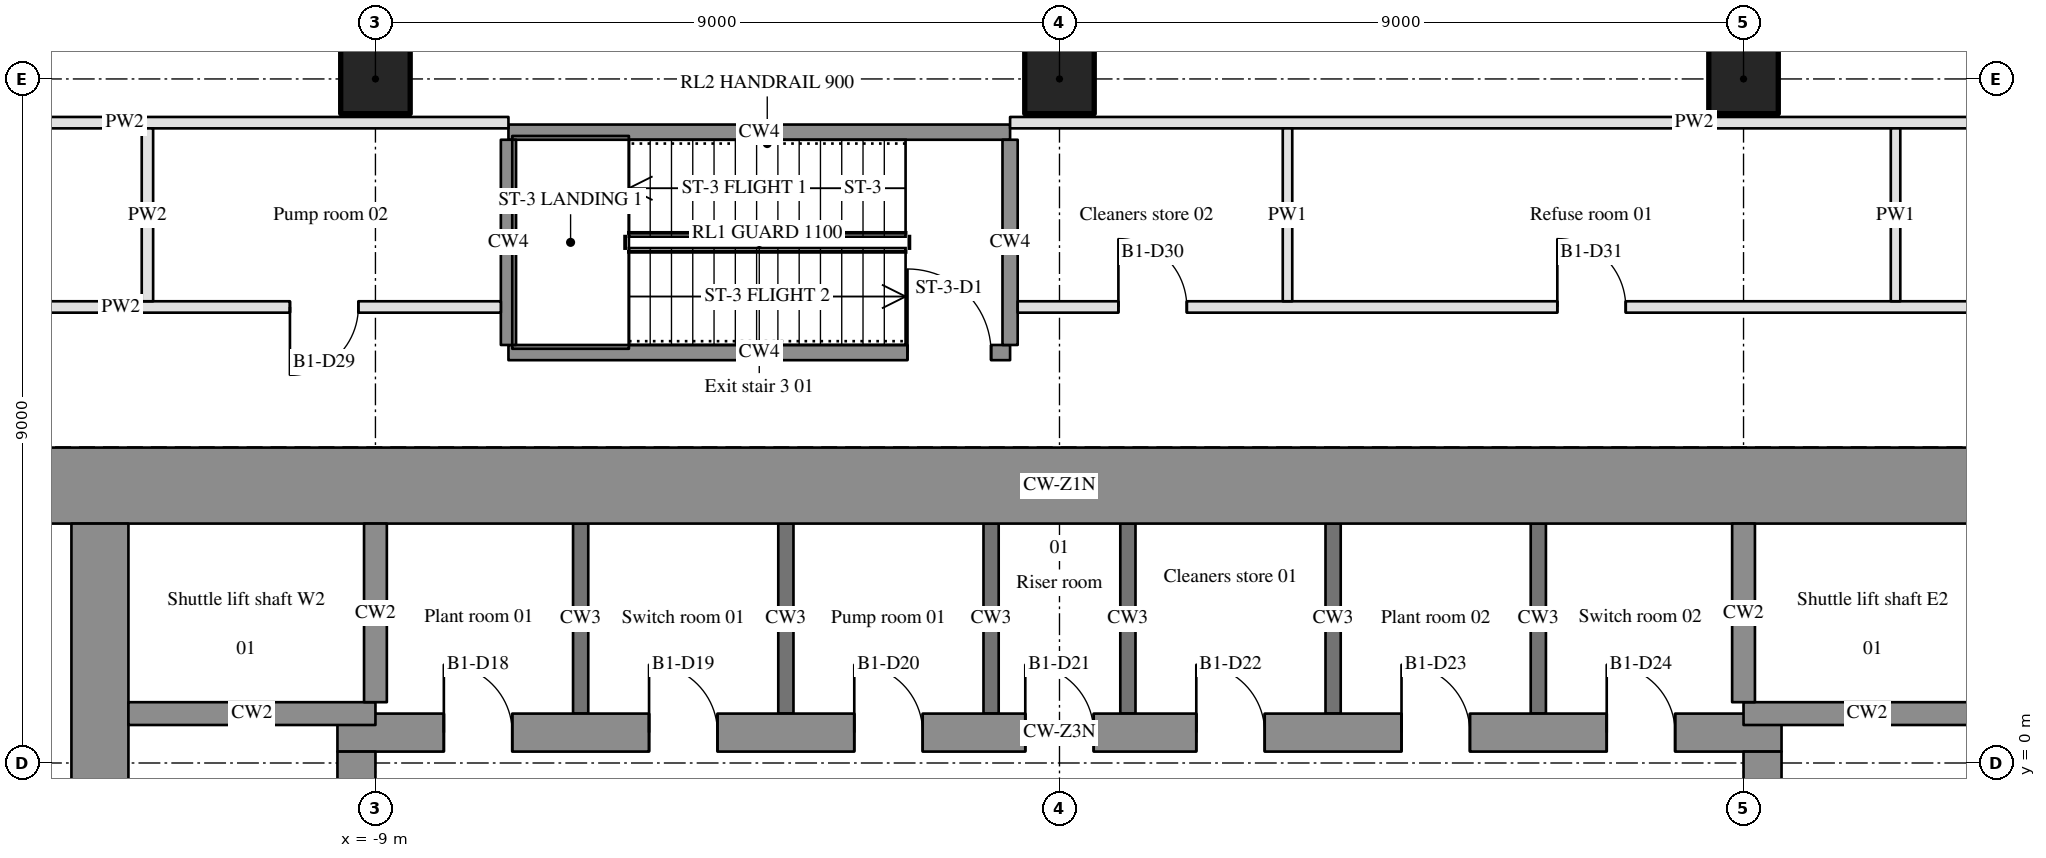
"""IFC4 building model, lengths in metres.
Left out: names, types, materials, properties, quantities, classifications, styles, units other than length and angle.
Written with IfcOpenShell. Run it as: python <this file> out.ifc"""

import sys

from ifc_helpers import new_model, si_unit, direction, frame, frame_2d, origin, origin_2d, place, context, subcontext, project, spatial, rectangle, hollow_circle, extrude, element, fill, save


model = new_model("IFC4")
c1 = context("Model", 3, precision=1e-05, world=origin(), true_north=direction((0.0, 1.0)))
c2 = subcontext(c1, "Body", "Model", "MODEL_VIEW")
j1 = project(units=[si_unit("LENGTHUNIT", "METRE"), si_unit("PLANEANGLEUNIT", "RADIAN")], contexts=[c1])
p1 = place(None, origin())
s1 = spatial("IfcSite", under=j1, at=p1, CompositionType="ELEMENT")
p2 = place(p1, origin())
s2 = spatial("IfcBuilding", under=s1, at=p2, CompositionType="ELEMENT")
p3 = place(p2, frame((0.0, 0.0, -5.0)))
s3 = spatial("IfcBuildingStorey", under=s2, at=p3, CompositionType="ELEMENT", Elevation=-5.0)
for number, where, z_axis, x_axis in (
    (1, (-9.0, 9.0, -0.25), (0.0, 0.0, 1.0), (1.0, 0.0, 0.0)),
    (2, (0.0, 9.0, -0.25), (0.0, 0.0, 1.0), (1.0, 0.0, 0.0)),
    (3, (9.0, 9.0, -0.25), (0.0, 0.0, 1.0), (1.0, 0.0, 0.0)),
):
    element("IfcColumn", number, at=place(p3, frame(where, z_axis=z_axis, x_axis=x_axis)), inside=s3, PredefinedType="COLUMN", context=c2, shape_type="SweptSolid", body=[
        extrude(hollow_circle(Radius=0.457, WallThickness=0.05, at=origin_2d()), origin(), (0.0, 0.0, 1.0), 5.25),
    ])
p4 = place(p3, frame((-15.0, 3.65, -0.25), z_axis=(0.0, 0.0, 1.0), x_axis=(1.0, 0.0, 0.0)))
e4 = element("IfcWall", 4, at=p4, inside=s3, PredefinedType="SHEAR", context=c2, shape_type="SweptSolid", body=[
    extrude(rectangle(XDim=30.0, YDim=1.0, at=frame_2d((15.0, 0.0))), origin(), (0.0, 0.0, 1.0), 5.25),
])
p5 = place(p3, frame((-12.625, -11.5, -0.25), z_axis=(0.0, 0.0, 1.0), x_axis=(0.0, 1.0, 0.0)))
e5 = element("IfcWall", 5, at=p5, inside=s3, PredefinedType="SHEAR", context=c2, shape_type="SweptSolid", body=[
    extrude(rectangle(XDim=14.65, YDim=0.75, at=frame_2d((7.325, 0.0))), origin(), (0.0, 0.0, 1.0), 5.25),
])
p6 = place(p5, frame((10.05, 0.0, 0.0)))
e6 = element("IfcOpeningElement", 6, at=p6, cuts=e5, PredefinedType="OPENING", context=c2, shape_type="SweptSolid", body=[
    extrude(rectangle(XDim=0.9, YDim=2.1, at=frame_2d((0.45, 1.05))), frame((0.0, 0.385, 0.0), z_axis=(0.0, -1.0, 0.0), x_axis=(1.0, 0.0, 0.0)), (0.0, 0.0, 1.0), 0.77),
])
p7 = place(p3, frame((-9.5, 0.4, -0.25), z_axis=(0.0, 0.0, 1.0), x_axis=(1.0, 0.0, 0.0)))
e7 = element("IfcWall", 7, at=p7, inside=s3, PredefinedType="SHEAR", context=c2, shape_type="SweptSolid", body=[
    extrude(rectangle(XDim=19.0, YDim=0.5, at=frame_2d((9.5, 0.0))), origin(), (0.0, 0.0, 1.0), 5.25),
])
p8 = place(p7, frame((1.4, 0.0, 0.0)))
e8 = element("IfcOpeningElement", 8, at=p8, cuts=e7, PredefinedType="OPENING", context=c2, shape_type="SweptSolid", body=[
    extrude(rectangle(XDim=0.9, YDim=2.1, at=frame_2d((0.45, 1.05))), frame((0.0, 0.26, 0.0), z_axis=(0.0, -1.0, 0.0), x_axis=(1.0, 0.0, 0.0)), (0.0, 0.0, 1.0), 0.52),
])
p9 = place(p7, frame((4.1, 0.0, 0.0)))
e9 = element("IfcOpeningElement", 9, at=p9, cuts=e7, PredefinedType="OPENING", context=c2, shape_type="SweptSolid", body=[
    extrude(rectangle(XDim=0.9, YDim=2.1, at=frame_2d((0.45, 1.05))), frame((0.0, 0.26, 0.0), z_axis=(0.0, -1.0, 0.0), x_axis=(1.0, 0.0, 0.0)), (0.0, 0.0, 1.0), 0.52),
])
p10 = place(p7, frame((6.8, 0.0, 0.0)))
e10 = element("IfcOpeningElement", 10, at=p10, cuts=e7, PredefinedType="OPENING", context=c2, shape_type="SweptSolid", body=[
    extrude(rectangle(XDim=0.9, YDim=2.1, at=frame_2d((0.45, 1.05))), frame((0.0, 0.26, 0.0), z_axis=(0.0, -1.0, 0.0), x_axis=(1.0, 0.0, 0.0)), (0.0, 0.0, 1.0), 0.52),
])
p11 = place(p7, frame((11.3, 0.0, 0.0)))
e11 = element("IfcOpeningElement", 11, at=p11, cuts=e7, PredefinedType="OPENING", context=c2, shape_type="SweptSolid", body=[
    extrude(rectangle(XDim=0.9, YDim=2.1, at=frame_2d((0.45, 1.05))), frame((0.0, 0.26, 0.0), z_axis=(0.0, -1.0, 0.0), x_axis=(1.0, 0.0, 0.0)), (0.0, 0.0, 1.0), 0.52),
])
p12 = place(p7, frame((14.0, 0.0, 0.0)))
e12 = element("IfcOpeningElement", 12, at=p12, cuts=e7, PredefinedType="OPENING", context=c2, shape_type="SweptSolid", body=[
    extrude(rectangle(XDim=0.9, YDim=2.1, at=frame_2d((0.45, 1.05))), frame((0.0, 0.26, 0.0), z_axis=(0.0, -1.0, 0.0), x_axis=(1.0, 0.0, 0.0)), (0.0, 0.0, 1.0), 0.52),
])
p13 = place(p7, frame((16.7, 0.0, 0.0)))
e13 = element("IfcOpeningElement", 13, at=p13, cuts=e7, PredefinedType="OPENING", context=c2, shape_type="SweptSolid", body=[
    extrude(rectangle(XDim=0.9, YDim=2.1, at=frame_2d((0.45, 1.05))), frame((0.0, 0.26, 0.0), z_axis=(0.0, -1.0, 0.0), x_axis=(1.0, 0.0, 0.0)), (0.0, 0.0, 1.0), 0.52),
])
p14 = place(p7, frame((9.05, 0.0, 0.0)))
e14 = element("IfcOpeningElement", 14, at=p14, cuts=e7, PredefinedType="OPENING", context=c2, shape_type="SweptSolid", body=[
    extrude(rectangle(XDim=0.9, YDim=2.1, at=frame_2d((0.45, 1.05))), frame((0.0, 0.26, 0.0), z_axis=(0.0, -1.0, 0.0), x_axis=(1.0, 0.0, 0.0)), (0.0, 0.0, 1.0), 0.52),
])
p15 = place(p3, frame((-9.25, -11.5, -0.25), z_axis=(0.0, 0.0, 1.0), x_axis=(0.0, 1.0, 0.0)))
e15 = element("IfcWall", 15, at=p15, inside=s3, PredefinedType="SHEAR", context=c2, shape_type="SweptSolid", body=[
    extrude(rectangle(XDim=11.65, YDim=0.5, at=frame_2d((5.825, 0.0))), origin(), (0.0, 0.0, 1.0), 5.25),
])
p16 = place(p15, frame((9.4, 0.0, 0.0)))
e16 = element("IfcOpeningElement", 16, at=p16, cuts=e15, PredefinedType="OPENING", context=c2, shape_type="SweptSolid", body=[
    extrude(rectangle(XDim=1.8, YDim=2.1, at=frame_2d((0.9, 1.05))), frame((0.0, 0.26, 0.0), z_axis=(0.0, -1.0, 0.0), x_axis=(1.0, 0.0, 0.0)), (0.0, 0.0, 1.0), 0.52),
])
p17 = place(p15, frame((5.25, 0.0, 0.0)))
e17 = element("IfcOpeningElement", 17, at=p17, cuts=e15, PredefinedType="OPENING", context=c2, shape_type="SweptSolid", body=[
    extrude(rectangle(XDim=1.1, YDim=2.1, at=frame_2d((0.55, 1.05))), frame((0.0, 0.26, 0.0), z_axis=(0.0, -1.0, 0.0), x_axis=(1.0, 0.0, 0.0)), (0.0, 0.0, 1.0), 0.52),
])
p18 = place(p3, frame((9.25, -11.5, -0.25), z_axis=(0.0, 0.0, 1.0), x_axis=(0.0, 1.0, 0.0)))
e18 = element("IfcWall", 18, at=p18, inside=s3, PredefinedType="SHEAR", context=c2, shape_type="SweptSolid", body=[
    extrude(rectangle(XDim=11.65, YDim=0.5, at=frame_2d((5.825, 0.0))), origin(), (0.0, 0.0, 1.0), 5.25),
])
p19 = place(p18, frame((9.4, 0.0, 0.0)))
e19 = element("IfcOpeningElement", 19, at=p19, cuts=e18, PredefinedType="OPENING", context=c2, shape_type="SweptSolid", body=[
    extrude(rectangle(XDim=1.8, YDim=2.1, at=frame_2d((0.9, 1.05))), frame((0.0, 0.26, 0.0), z_axis=(0.0, -1.0, 0.0), x_axis=(1.0, 0.0, 0.0)), (0.0, 0.0, 1.0), 0.52),
])
p20 = place(p18, frame((5.25, 0.0, 0.0)))
e20 = element("IfcOpeningElement", 20, at=p20, cuts=e18, PredefinedType="OPENING", context=c2, shape_type="SweptSolid", body=[
    extrude(rectangle(XDim=1.1, YDim=2.1, at=frame_2d((0.55, 1.05))), frame((0.0, 0.26, 0.0), z_axis=(0.0, -1.0, 0.0), x_axis=(1.0, 0.0, 0.0)), (0.0, 0.0, 1.0), 0.52),
])
for number, where, z_axis, x_axis in (
    (21, (-9.0, 0.65, 0.0), (0.0, 0.0, 1.0), (-1.0, 0.0, 0.0)),
    (22, (12.25, 0.65, 0.0), (0.0, 0.0, 1.0), (-1.0, 0.0, 0.0)),
):
    element("IfcWall", number, at=place(p3, frame(where, z_axis=z_axis, x_axis=x_axis)), inside=s3, PredefinedType="SHEAR", context=c2, shape_type="SweptSolid", body=[
        extrude(rectangle(XDim=3.25, YDim=0.3, at=frame_2d((1.625, 0.0))), origin(), (0.0, 0.0, 1.0), 5.0),
    ])
p21 = place(p3, frame((-7.25, 5.4, 0.0), z_axis=(0.0, 0.0, 1.0), x_axis=(1.0, 0.0, 0.0)))
e23 = element("IfcWall", 23, at=p21, inside=s3, PredefinedType="SHEAR", context=c2, shape_type="SweptSolid", body=[
    extrude(rectangle(XDim=6.6, YDim=0.2, at=frame_2d((3.3, 0.0))), origin(), (0.0, 0.0, 1.0), 5.0),
])
p22 = place(p21, frame((5.25, 0.0, 0.0)))
e24 = element("IfcOpeningElement", 24, at=p22, cuts=e23, PredefinedType="OPENING", context=c2, shape_type="SweptSolid", body=[
    extrude(rectangle(XDim=1.1, YDim=2.1, at=frame_2d((0.55, 1.05))), frame((0.0, 0.11, 0.0), z_axis=(0.0, -1.0, 0.0), x_axis=(1.0, 0.0, 0.0)), (0.0, 0.0, 1.0), 0.22),
])
p23 = place(p3, frame((-7.35, 6.0, 0.0), z_axis=(0.0, 0.0, 1.0), x_axis=(-1.0, 0.0, 0.0)))
e25 = element("IfcWall", 25, at=p23, inside=s3, PredefinedType="PARTITIONING", context=c2, shape_type="SweptSolid", body=[
    extrude(rectangle(XDim=10.0, YDim=0.15, at=frame_2d((5.0, 0.0))), origin(), (0.0, 0.0, 1.0), 4.06),
])
p24 = place(p23, frame((6.825, 0.0, 0.0)))
e26 = element("IfcOpeningElement", 26, at=p24, cuts=e25, PredefinedType="OPENING", context=c2, shape_type="SweptSolid", body=[
    extrude(rectangle(XDim=1.0, YDim=2.1, at=frame_2d((0.5, 1.05))), frame((0.0, 0.085, 0.0), z_axis=(0.0, -1.0, 0.0), x_axis=(1.0, 0.0, 0.0)), (0.0, 0.0, 1.0), 0.17),
])
p25 = place(p23, frame((1.875, 0.0, 0.0)))
e27 = element("IfcOpeningElement", 27, at=p25, cuts=e25, PredefinedType="OPENING", context=c2, shape_type="SweptSolid", body=[
    extrude(rectangle(XDim=0.9, YDim=2.1, at=frame_2d((0.45, 1.05))), frame((0.0, 0.085, 0.0), z_axis=(0.0, -1.0, 0.0), x_axis=(1.0, 0.0, 0.0)), (0.0, 0.0, 1.0), 0.17),
])
p26 = place(p3, frame((-0.55, 6.0, 0.0), z_axis=(0.0, 0.0, 1.0), x_axis=(1.0, 0.0, 0.0)))
e28 = element("IfcWall", 28, at=p26, inside=s3, PredefinedType="PARTITIONING", context=c2, shape_type="SweptSolid", body=[
    extrude(rectangle(XDim=17.9, YDim=0.15, at=frame_2d((8.95, 0.0))), origin(), (0.0, 0.0, 1.0), 4.06),
])
p27 = place(p26, frame((1.325, 0.0, 0.0)))
e29 = element("IfcOpeningElement", 29, at=p27, cuts=e28, PredefinedType="OPENING", context=c2, shape_type="SweptSolid", body=[
    extrude(rectangle(XDim=0.9, YDim=2.1, at=frame_2d((0.45, 1.05))), frame((0.0, 0.085, 0.0), z_axis=(0.0, -1.0, 0.0), x_axis=(1.0, 0.0, 0.0)), (0.0, 0.0, 1.0), 0.17),
])
p28 = place(p26, frame((7.1, 0.0, 0.0)))
e30 = element("IfcOpeningElement", 30, at=p28, cuts=e28, PredefinedType="OPENING", context=c2, shape_type="SweptSolid", body=[
    extrude(rectangle(XDim=0.9, YDim=2.1, at=frame_2d((0.45, 1.05))), frame((0.0, 0.085, 0.0), z_axis=(0.0, -1.0, 0.0), x_axis=(1.0, 0.0, 0.0)), (0.0, 0.0, 1.0), 0.17),
])
p29 = place(p26, frame((14.275, 0.0, 0.0)))
e31 = element("IfcOpeningElement", 31, at=p29, cuts=e28, PredefinedType="OPENING", context=c2, shape_type="SweptSolid", body=[
    extrude(rectangle(XDim=0.9, YDim=2.1, at=frame_2d((0.45, 1.05))), frame((0.0, 0.085, 0.0), z_axis=(0.0, -1.0, 0.0), x_axis=(1.0, 0.0, 0.0)), (0.0, 0.0, 1.0), 0.17),
])
p30 = place(p3, frame((-7.25, 8.3, 0.0), z_axis=(0.0, 0.0, 1.0), x_axis=(1.0, 0.0, 0.0)))
e32 = element("IfcWall", 32, at=p30, inside=s3, PredefinedType="SHEAR", context=c2, shape_type="SweptSolid", body=[
    extrude(rectangle(XDim=6.6, YDim=0.2, at=frame_2d((3.3, 0.0))), origin(), (0.0, 0.0, 1.0), 5.0),
])
p31 = place(p3, frame((-17.35, 8.425, 0.0), z_axis=(0.0, 0.0, 1.0), x_axis=(1.0, 0.0, 0.0)))
e33 = element("IfcWall", 33, at=p31, inside=s3, PredefinedType="PARTITIONING", context=c2, shape_type="SweptSolid", body=[
    extrude(rectangle(XDim=10.1, YDim=0.15, at=frame_2d((5.05, 0.0))), origin(), (0.0, 0.0, 1.0), 4.06),
])
p32 = place(p31, frame((1.775, 0.0, 0.0)))
e34 = element("IfcOpeningElement", 34, at=p32, cuts=e33, PredefinedType="OPENING", context=c2, shape_type="SweptSolid", body=[
    extrude(rectangle(XDim=1.8, YDim=2.1, at=frame_2d((0.9, 1.05))), frame((0.0, 0.085, 0.0), z_axis=(0.0, -1.0, 0.0), x_axis=(1.0, 0.0, 0.0)), (0.0, 0.0, 1.0), 0.17),
])
p33 = place(p3, frame((-0.65, 8.425, 0.0), z_axis=(0.0, 0.0, 1.0), x_axis=(1.0, 0.0, 0.0)))
e35 = element("IfcWall", 35, at=p33, inside=s3, PredefinedType="PARTITIONING", context=c2, shape_type="SweptSolid", body=[
    extrude(rectangle(XDim=18.0, YDim=0.15, at=frame_2d((9.0, 0.0))), origin(), (0.0, 0.0, 1.0), 4.06),
])
p34 = place(p3, frame((-12.0, 6.075, 0.0), z_axis=(0.0, 0.0, 1.0), x_axis=(0.0, 1.0, 0.0)))
e36 = element("IfcWall", 36, at=p34, inside=s3, PredefinedType="PARTITIONING", context=c2, shape_type="SweptSolid", body=[
    extrude(rectangle(XDim=2.275, YDim=0.15, at=frame_2d((1.138, 0.0))), origin(), (0.0, 0.0, 1.0), 4.06),
])
p35 = place(p3, frame((-9.0, 0.8, 0.0), z_axis=(0.0, 0.0, 1.0), x_axis=(0.0, 1.0, 0.0)))
e37 = element("IfcWall", 37, at=p35, inside=s3, PredefinedType="SHEAR", context=c2, shape_type="SweptSolid", body=[
    extrude(rectangle(XDim=2.35, YDim=0.3, at=frame_2d((1.175, 0.0))), origin(), (0.0, 0.0, 1.0), 5.0),
])
p36 = place(p3, frame((-7.25, 5.5, 0.0), z_axis=(0.0, 0.0, 1.0), x_axis=(0.0, 1.0, 0.0)))
e38 = element("IfcWall", 38, at=p36, inside=s3, PredefinedType="SHEAR", context=c2, shape_type="SweptSolid", body=[
    extrude(rectangle(XDim=2.7, YDim=0.2, at=frame_2d((1.35, 0.0))), origin(), (0.0, 0.0, 1.0), 5.0),
])
for number, where, z_axis, x_axis in (
    (39, (-6.3, 0.65, 0.0), (0.0, 0.0, 1.0), (0.0, 1.0, 0.0)),
    (40, (-3.6, 0.65, 0.0), (0.0, 0.0, 1.0), (0.0, 1.0, 0.0)),
    (41, (-0.9, 0.65, 0.0), (0.0, 0.0, 1.0), (0.0, 1.0, 0.0)),
):
    element("IfcWall", number, at=place(p3, frame(where, z_axis=z_axis, x_axis=x_axis)), inside=s3, PredefinedType="SOLIDWALL", context=c2, shape_type="SweptSolid", body=[
        extrude(rectangle(XDim=2.5, YDim=0.2, at=frame_2d((1.25, 0.0))), origin(), (0.0, 0.0, 1.0), 4.7),
    ])
p37 = place(p3, frame((-0.65, 5.5, 0.0), z_axis=(0.0, 0.0, 1.0), x_axis=(0.0, 1.0, 0.0)))
e42 = element("IfcWall", 42, at=p37, inside=s3, PredefinedType="SHEAR", context=c2, shape_type="SweptSolid", body=[
    extrude(rectangle(XDim=2.7, YDim=0.2, at=frame_2d((1.35, 0.0))), origin(), (0.0, 0.0, 1.0), 5.0),
])
p38 = place(p3, frame((0.9, 0.65, 0.0), z_axis=(0.0, 0.0, 1.0), x_axis=(0.0, 1.0, 0.0)))
e43 = element("IfcWall", 43, at=p38, inside=s3, PredefinedType="SOLIDWALL", context=c2, shape_type="SweptSolid", body=[
    extrude(rectangle(XDim=2.5, YDim=0.2, at=frame_2d((1.25, 0.0))), origin(), (0.0, 0.0, 1.0), 4.7),
])
p39 = place(p3, frame((3.0, 6.075, 0.0), z_axis=(0.0, 0.0, 1.0), x_axis=(0.0, 1.0, 0.0)))
e44 = element("IfcWall", 44, at=p39, inside=s3, PredefinedType="PARTITIONING", context=c2, shape_type="SweptSolid", body=[
    extrude(rectangle(XDim=2.275, YDim=0.125, at=frame_2d((1.138, 0.0))), origin(), (0.0, 0.0, 1.0), 4.06),
])
for number, where, z_axis, x_axis in (
    (45, (3.6, 0.65, 0.0), (0.0, 0.0, 1.0), (0.0, 1.0, 0.0)),
    (46, (6.3, 0.65, 0.0), (0.0, 0.0, 1.0), (0.0, 1.0, 0.0)),
):
    element("IfcWall", number, at=place(p3, frame(where, z_axis=z_axis, x_axis=x_axis)), inside=s3, PredefinedType="SOLIDWALL", context=c2, shape_type="SweptSolid", body=[
        extrude(rectangle(XDim=2.5, YDim=0.2, at=frame_2d((1.25, 0.0))), origin(), (0.0, 0.0, 1.0), 4.7),
    ])
p40 = place(p3, frame((9.0, 0.8, 0.0), z_axis=(0.0, 0.0, 1.0), x_axis=(0.0, 1.0, 0.0)))
e47 = element("IfcWall", 47, at=p40, inside=s3, PredefinedType="SHEAR", context=c2, shape_type="SweptSolid", body=[
    extrude(rectangle(XDim=2.35, YDim=0.3, at=frame_2d((1.175, 0.0))), origin(), (0.0, 0.0, 1.0), 5.0),
])
p41 = place(p3, frame((11.0, 6.075, 0.0), z_axis=(0.0, 0.0, 1.0), x_axis=(0.0, 1.0, 0.0)))
e48 = element("IfcWall", 48, at=p41, inside=s3, PredefinedType="PARTITIONING", context=c2, shape_type="SweptSolid", body=[
    extrude(rectangle(XDim=2.275, YDim=0.125, at=frame_2d((1.138, 0.0))), origin(), (0.0, 0.0, 1.0), 4.06),
])
p42 = place(p22, origin())
e49 = element("IfcDoor", 49, at=p42, inside=s3, OperationType="SINGLE_SWING_LEFT", PredefinedType="DOOR", context=c2, shape_type="SweptSolid", body=[
    extrude(rectangle(XDim=1.1, YDim=2.1, at=frame_2d((0.55, 1.05))), frame((0.0, 0.025, 0.0), z_axis=(0.0, -1.0, 0.0), x_axis=(1.0, 0.0, 0.0)), (0.0, 0.0, 1.0), 0.05),
])
fill(e24, e49)
p43 = place(p8, origin())
e50 = element("IfcDoor", 50, at=p43, inside=s3, OperationType="SINGLE_SWING_LEFT", PredefinedType="DOOR", context=c2, shape_type="SweptSolid", body=[
    extrude(rectangle(XDim=0.9, YDim=2.1, at=frame_2d((0.45, 1.05))), frame((0.0, 0.025, 0.0), z_axis=(0.0, -1.0, 0.0), x_axis=(1.0, 0.0, 0.0)), (0.0, 0.0, 1.0), 0.05),
])
fill(e8, e50)
p44 = place(p9, origin())
e51 = element("IfcDoor", 51, at=p44, inside=s3, OperationType="SINGLE_SWING_LEFT", PredefinedType="DOOR", context=c2, shape_type="SweptSolid", body=[
    extrude(rectangle(XDim=0.9, YDim=2.1, at=frame_2d((0.45, 1.05))), frame((0.0, 0.025, 0.0), z_axis=(0.0, -1.0, 0.0), x_axis=(1.0, 0.0, 0.0)), (0.0, 0.0, 1.0), 0.05),
])
fill(e9, e51)
p45 = place(p10, origin())
e52 = element("IfcDoor", 52, at=p45, inside=s3, OperationType="SINGLE_SWING_LEFT", PredefinedType="DOOR", context=c2, shape_type="SweptSolid", body=[
    extrude(rectangle(XDim=0.9, YDim=2.1, at=frame_2d((0.45, 1.05))), frame((0.0, 0.025, 0.0), z_axis=(0.0, -1.0, 0.0), x_axis=(1.0, 0.0, 0.0)), (0.0, 0.0, 1.0), 0.05),
])
fill(e10, e52)
p46 = place(p11, origin())
e53 = element("IfcDoor", 53, at=p46, inside=s3, OperationType="SINGLE_SWING_LEFT", PredefinedType="DOOR", context=c2, shape_type="SweptSolid", body=[
    extrude(rectangle(XDim=0.9, YDim=2.1, at=frame_2d((0.45, 1.05))), frame((0.0, 0.025, 0.0), z_axis=(0.0, -1.0, 0.0), x_axis=(1.0, 0.0, 0.0)), (0.0, 0.0, 1.0), 0.05),
])
fill(e11, e53)
p47 = place(p12, origin())
e54 = element("IfcDoor", 54, at=p47, inside=s3, OperationType="SINGLE_SWING_LEFT", PredefinedType="DOOR", context=c2, shape_type="SweptSolid", body=[
    extrude(rectangle(XDim=0.9, YDim=2.1, at=frame_2d((0.45, 1.05))), frame((0.0, 0.025, 0.0), z_axis=(0.0, -1.0, 0.0), x_axis=(1.0, 0.0, 0.0)), (0.0, 0.0, 1.0), 0.05),
])
fill(e12, e54)
p48 = place(p13, origin())
e55 = element("IfcDoor", 55, at=p48, inside=s3, OperationType="SINGLE_SWING_LEFT", PredefinedType="DOOR", context=c2, shape_type="SweptSolid", body=[
    extrude(rectangle(XDim=0.9, YDim=2.1, at=frame_2d((0.45, 1.05))), frame((0.0, 0.025, 0.0), z_axis=(0.0, -1.0, 0.0), x_axis=(1.0, 0.0, 0.0)), (0.0, 0.0, 1.0), 0.05),
])
fill(e13, e55)
p49 = place(p14, origin())
e56 = element("IfcDoor", 56, at=p49, inside=s3, OperationType="SINGLE_SWING_LEFT", PredefinedType="DOOR", context=c2, shape_type="SweptSolid", body=[
    extrude(rectangle(XDim=0.9, YDim=2.1, at=frame_2d((0.45, 1.05))), frame((0.0, 0.025, 0.0), z_axis=(0.0, -1.0, 0.0), x_axis=(1.0, 0.0, 0.0)), (0.0, 0.0, 1.0), 0.05),
])
fill(e14, e56)
p50 = place(p25, origin())
e57 = element("IfcDoor", 57, at=p50, inside=s3, OperationType="SINGLE_SWING_RIGHT", PredefinedType="DOOR", context=c2, shape_type="SweptSolid", body=[
    extrude(rectangle(XDim=0.9, YDim=2.1, at=frame_2d((0.45, 1.05))), frame((0.0, 0.025, 0.0), z_axis=(0.0, -1.0, 0.0), x_axis=(1.0, 0.0, 0.0)), (0.0, 0.0, 1.0), 0.05),
])
fill(e27, e57)
p51 = place(p27, origin())
e58 = element("IfcDoor", 58, at=p51, inside=s3, OperationType="SINGLE_SWING_LEFT", PredefinedType="DOOR", context=c2, shape_type="SweptSolid", body=[
    extrude(rectangle(XDim=0.9, YDim=2.1, at=frame_2d((0.45, 1.05))), frame((0.0, 0.025, 0.0), z_axis=(0.0, -1.0, 0.0), x_axis=(1.0, 0.0, 0.0)), (0.0, 0.0, 1.0), 0.05),
])
fill(e29, e58)
p52 = place(p28, origin())
e59 = element("IfcDoor", 59, at=p52, inside=s3, OperationType="SINGLE_SWING_LEFT", PredefinedType="DOOR", context=c2, shape_type="SweptSolid", body=[
    extrude(rectangle(XDim=0.9, YDim=2.1, at=frame_2d((0.45, 1.05))), frame((0.0, 0.025, 0.0), z_axis=(0.0, -1.0, 0.0), x_axis=(1.0, 0.0, 0.0)), (0.0, 0.0, 1.0), 0.05),
])
fill(e30, e59)
save(model, sys.argv[1])
